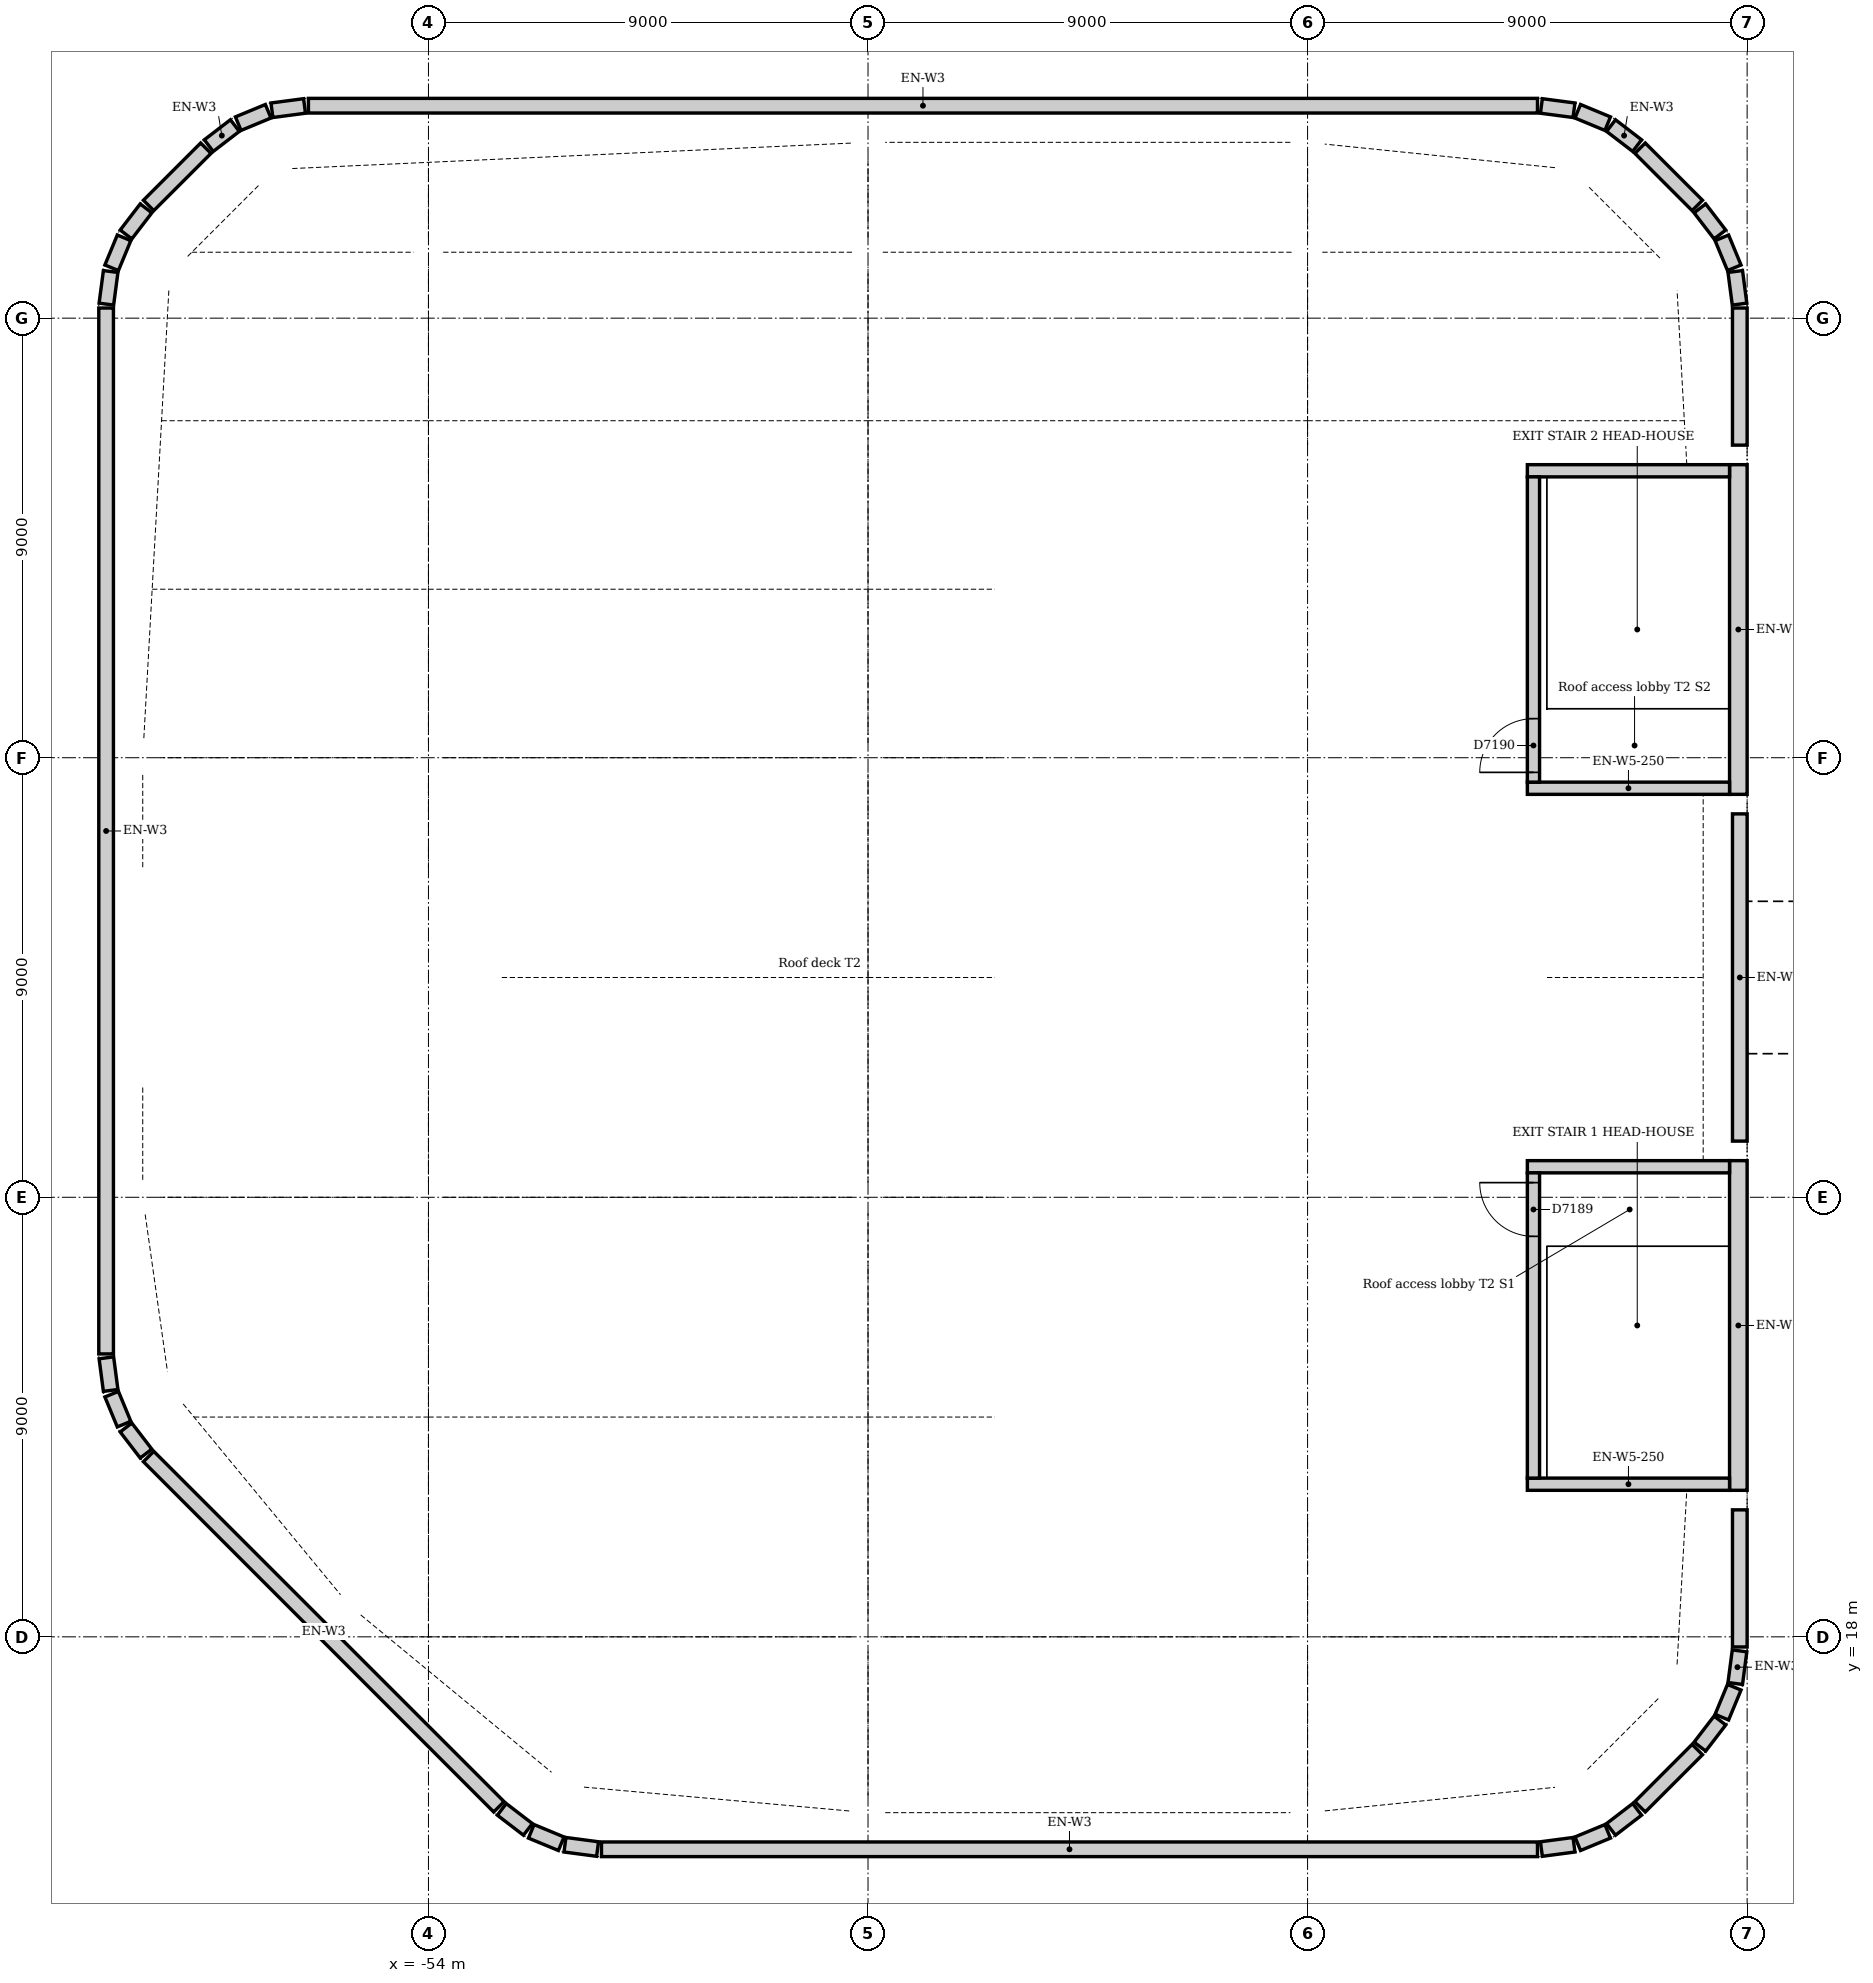
"""IFC4 building model, lengths in metres.
Left out: names, types, materials, properties, quantities, classifications, styles, units other than length and angle.
Written with IfcOpenShell. Run it as: python <this file> out.ifc"""

import sys

from ifc_helpers import new_model, si_unit, direction, frame, frame_2d, origin, place, context, subcontext, project, spatial, rectangle, extrude, element, fill, save


model = new_model("IFC4")
c1 = context("Model", 3, precision=1e-05, world=origin(), true_north=direction((0.0, 1.0)))
c2 = subcontext(c1, "Body", "Model", "MODEL_VIEW")
j1 = project(units=[si_unit("LENGTHUNIT", "METRE"), si_unit("PLANEANGLEUNIT", "RADIAN")], contexts=[c1])
p1 = place(None, origin())
s1 = spatial("IfcSite", under=j1, at=p1, CompositionType="ELEMENT")
p2 = place(p1, origin())
s2 = spatial("IfcBuilding", under=s1, at=p2, CompositionType="ELEMENT")
p3 = place(p2, frame((0.0, 0.0, 144.0)))
s3 = spatial("IfcBuildingStorey", under=s2, at=p3, CompositionType="ELEMENT", Elevation=144.0)
p4 = place(p3, frame((-52.558, 14.52, 0.0), z_axis=(0.0, 0.0, 1.0), x_axis=(-0.707106781187, 0.707106781187, 0.0)))
e1 = element("IfcWall", 1, at=p4, inside=s3, PredefinedType="PARAPET", context=c2, shape_type="SweptSolid", body=[
    extrude(rectangle(XDim=10.143, YDim=0.3, at=frame_2d((5.072, 0.0))), origin(), (0.0, 0.0, 1.0), 1.2),
])
p5 = place(p3, frame((-59.783, 21.752, 0.0), z_axis=(0.0, 0.0, 1.0), x_axis=(-0.608705788034, 0.793396032013, 0.0)))
e2 = element("IfcWall", 2, at=p5, inside=s3, PredefinedType="PARAPET", context=c2, shape_type="SweptSolid", body=[
    extrude(rectangle(XDim=0.674, YDim=0.3, at=frame_2d((0.337, 0.0))), origin(), (0.0, 0.0, 1.0), 1.2),
])
p6 = place(p3, frame((-60.232, 22.355, 0.0), z_axis=(0.0, 0.0, 1.0), x_axis=(-0.382560278547, 0.923930534877, 0.0)))
e3 = element("IfcWall", 3, at=p6, inside=s3, PredefinedType="PARAPET", context=c2, shape_type="SweptSolid", body=[
    extrude(rectangle(XDim=0.664, YDim=0.3, at=frame_2d((0.332, 0.0))), origin(), (0.0, 0.0, 1.0), 1.2),
])
p7 = place(p3, frame((-60.507, 23.045, 0.0), z_axis=(0.0, 0.0, 1.0), x_axis=(-0.130500598182, 0.991448230557, 0.0)))
e4 = element("IfcWall", 4, at=p7, inside=s3, PredefinedType="PARAPET", context=c2, shape_type="SweptSolid", body=[
    extrude(rectangle(XDim=0.674, YDim=0.3, at=frame_2d((0.337, 0.0))), origin(), (0.0, 0.0, 1.0), 1.2),
])
p8 = place(p3, frame((-60.6, 23.793, 0.0), z_axis=(0.0, 0.0, 1.0), x_axis=(0.0, 1.0, 0.0)))
e5 = element("IfcWall", 5, at=p8, inside=s3, PredefinedType="PARAPET", context=c2, shape_type="SweptSolid", body=[
    extrude(rectangle(XDim=21.415, YDim=0.3, at=frame_2d((10.707, 0.0))), origin(), (0.0, 0.0, 1.0), 1.2),
])
p9 = place(p3, frame((-60.595, 45.287, 0.0), z_axis=(0.0, 0.0, 1.0), x_axis=(0.130500598182, 0.991448230557, 0.0)))
e6 = element("IfcWall", 6, at=p9, inside=s3, PredefinedType="PARAPET", context=c2, shape_type="SweptSolid", body=[
    extrude(rectangle(XDim=0.674, YDim=0.3, at=frame_2d((0.337, 0.0))), origin(), (0.0, 0.0, 1.0), 1.2),
])
p10 = place(p3, frame((-60.486, 46.032, 0.0), z_axis=(0.0, 0.0, 1.0), x_axis=(0.382560278547, 0.923930534877, 0.0)))
e7 = element("IfcWall", 7, at=p10, inside=s3, PredefinedType="PARAPET", context=c2, shape_type="SweptSolid", body=[
    extrude(rectangle(XDim=0.664, YDim=0.3, at=frame_2d((0.332, 0.0))), origin(), (0.0, 0.0, 1.0), 1.2),
])
p11 = place(p3, frame((-60.193, 46.713, 0.0), z_axis=(0.0, 0.0, 1.0), x_axis=(0.608705788034, 0.793396032013, 0.0)))
e8 = element("IfcWall", 8, at=p11, inside=s3, PredefinedType="PARAPET", context=c2, shape_type="SweptSolid", body=[
    extrude(rectangle(XDim=0.674, YDim=0.3, at=frame_2d((0.337, 0.0))), origin(), (0.0, 0.0, 1.0), 1.2),
])
p12 = place(p3, frame((-59.73, 47.308, 0.0), z_axis=(0.0, 0.0, 1.0), x_axis=(0.707106781187, 0.707106781187, 0.0)))
e9 = element("IfcWall", 9, at=p12, inside=s3, PredefinedType="PARAPET", context=c2, shape_type="SweptSolid", body=[
    extrude(rectangle(XDim=1.658, YDim=0.3, at=frame_2d((0.829, 0.0))), origin(), (0.0, 0.0, 1.0), 1.2),
])
p13 = place(p3, frame((-58.498, 48.533, 0.0), z_axis=(0.0, 0.0, 1.0), x_axis=(0.793396032013, 0.608705788034, 0.0)))
e10 = element("IfcWall", 10, at=p13, inside=s3, PredefinedType="PARAPET", context=c2, shape_type="SweptSolid", body=[
    extrude(rectangle(XDim=0.674, YDim=0.3, at=frame_2d((0.337, 0.0))), origin(), (0.0, 0.0, 1.0), 1.2),
])
p14 = place(p3, frame((-57.895, 48.982, 0.0), z_axis=(0.0, 0.0, 1.0), x_axis=(0.923930534877, 0.382560278547, 0.0)))
e11 = element("IfcWall", 11, at=p14, inside=s3, PredefinedType="PARAPET", context=c2, shape_type="SweptSolid", body=[
    extrude(rectangle(XDim=0.664, YDim=0.3, at=frame_2d((0.332, 0.0))), origin(), (0.0, 0.0, 1.0), 1.2),
])
p15 = place(p3, frame((-57.205, 49.257, 0.0), z_axis=(0.0, 0.0, 1.0), x_axis=(0.991448230557, 0.130500598182, 0.0)))
e12 = element("IfcWall", 12, at=p15, inside=s3, PredefinedType="PARAPET", context=c2, shape_type="SweptSolid", body=[
    extrude(rectangle(XDim=0.674, YDim=0.3, at=frame_2d((0.337, 0.0))), origin(), (0.0, 0.0, 1.0), 1.2),
])
p16 = place(p3, frame((-56.458, 49.35, 0.0), z_axis=(0.0, 0.0, 1.0), x_axis=(1.0, 0.0, 0.0)))
e13 = element("IfcWall", 13, at=p16, inside=s3, PredefinedType="PARAPET", context=c2, shape_type="SweptSolid", body=[
    extrude(rectangle(XDim=25.165, YDim=0.3, at=frame_2d((12.582, 0.0))), origin(), (0.0, 0.0, 1.0), 1.2),
])
p17 = place(p3, frame((-31.213, 49.345, 0.0), z_axis=(0.0, 0.0, 1.0), x_axis=(0.991448230557, -0.130500598182, 0.0)))
e14 = element("IfcWall", 14, at=p17, inside=s3, PredefinedType="PARAPET", context=c2, shape_type="SweptSolid", body=[
    extrude(rectangle(XDim=0.674, YDim=0.3, at=frame_2d((0.337, 0.0))), origin(), (0.0, 0.0, 1.0), 1.2),
])
p18 = place(p3, frame((-30.468, 49.236, 0.0), z_axis=(0.0, 0.0, 1.0), x_axis=(0.923930534877, -0.382560278547, 0.0)))
e15 = element("IfcWall", 15, at=p18, inside=s3, PredefinedType="PARAPET", context=c2, shape_type="SweptSolid", body=[
    extrude(rectangle(XDim=0.664, YDim=0.3, at=frame_2d((0.332, 0.0))), origin(), (0.0, 0.0, 1.0), 1.2),
])
p19 = place(p3, frame((-29.787, 48.943, 0.0), z_axis=(0.0, 0.0, 1.0), x_axis=(0.793396032013, -0.608705788034, 0.0)))
e16 = element("IfcWall", 16, at=p19, inside=s3, PredefinedType="PARAPET", context=c2, shape_type="SweptSolid", body=[
    extrude(rectangle(XDim=0.674, YDim=0.3, at=frame_2d((0.337, 0.0))), origin(), (0.0, 0.0, 1.0), 1.2),
])
p20 = place(p3, frame((-29.192, 48.48, 0.0), z_axis=(0.0, 0.0, 1.0), x_axis=(0.707106781187, -0.707106781187, 0.0)))
e17 = element("IfcWall", 17, at=p20, inside=s3, PredefinedType="PARAPET", context=c2, shape_type="SweptSolid", body=[
    extrude(rectangle(XDim=1.658, YDim=0.3, at=frame_2d((0.829, 0.0))), origin(), (0.0, 0.0, 1.0), 1.2),
])
p21 = place(p3, frame((-27.967, 47.248, 0.0), z_axis=(0.0, 0.0, 1.0), x_axis=(0.608705788034, -0.793396032013, 0.0)))
e18 = element("IfcWall", 18, at=p21, inside=s3, PredefinedType="PARAPET", context=c2, shape_type="SweptSolid", body=[
    extrude(rectangle(XDim=0.674, YDim=0.3, at=frame_2d((0.337, 0.0))), origin(), (0.0, 0.0, 1.0), 1.2),
])
p22 = place(p3, frame((-27.518, 46.645, 0.0), z_axis=(0.0, 0.0, 1.0), x_axis=(0.382560278547, -0.923930534877, 0.0)))
e19 = element("IfcWall", 19, at=p22, inside=s3, PredefinedType="PARAPET", context=c2, shape_type="SweptSolid", body=[
    extrude(rectangle(XDim=0.664, YDim=0.3, at=frame_2d((0.332, 0.0))), origin(), (0.0, 0.0, 1.0), 1.2),
])
p23 = place(p3, frame((-27.243, 45.955, 0.0), z_axis=(0.0, 0.0, 1.0), x_axis=(0.130500598182, -0.991448230557, 0.0)))
e20 = element("IfcWall", 20, at=p23, inside=s3, PredefinedType="PARAPET", context=c2, shape_type="SweptSolid", body=[
    extrude(rectangle(XDim=0.674, YDim=0.3, at=frame_2d((0.337, 0.0))), origin(), (0.0, 0.0, 1.0), 1.2),
])
p24 = place(p3, frame((-27.15, 45.208, 0.0), z_axis=(0.0, 0.0, 1.0), x_axis=(0.0, -1.0, 0.0)))
e21 = element("IfcWall", 21, at=p24, inside=s3, PredefinedType="PARAPET", context=c2, shape_type="SweptSolid", body=[
    extrude(rectangle(XDim=2.808, YDim=0.3, at=frame_2d((1.404, 0.0))), origin(), (0.0, 0.0, 1.0), 1.2),
])
p25 = place(p3, frame((-27.15, 34.85, 0.0), z_axis=(0.0, 0.0, 1.0), x_axis=(0.0, -1.0, 0.0)))
e22 = element("IfcWall", 22, at=p25, inside=s3, PredefinedType="PARAPET", context=c2, shape_type="SweptSolid", body=[
    extrude(rectangle(XDim=6.7, YDim=0.3, at=frame_2d((3.35, 0.0))), origin(), (0.0, 0.0, 1.0), 1.2),
])
p26 = place(p3, frame((-27.15, 20.6, 0.0), z_axis=(0.0, 0.0, 1.0), x_axis=(0.0, -1.0, 0.0)))
e23 = element("IfcWall", 23, at=p26, inside=s3, PredefinedType="PARAPET", context=c2, shape_type="SweptSolid", body=[
    extrude(rectangle(XDim=2.808, YDim=0.3, at=frame_2d((1.404, 0.0))), origin(), (0.0, 0.0, 1.0), 1.2),
])
p27 = place(p3, frame((-27.155, 17.713, 0.0), z_axis=(0.0, 0.0, 1.0), x_axis=(-0.130500598182, -0.991448230557, 0.0)))
e24 = element("IfcWall", 24, at=p27, inside=s3, PredefinedType="PARAPET", context=c2, shape_type="SweptSolid", body=[
    extrude(rectangle(XDim=0.674, YDim=0.3, at=frame_2d((0.337, 0.0))), origin(), (0.0, 0.0, 1.0), 1.2),
])
p28 = place(p3, frame((-27.264, 16.968, 0.0), z_axis=(0.0, 0.0, 1.0), x_axis=(-0.382560278547, -0.923930534877, 0.0)))
e25 = element("IfcWall", 25, at=p28, inside=s3, PredefinedType="PARAPET", context=c2, shape_type="SweptSolid", body=[
    extrude(rectangle(XDim=0.664, YDim=0.3, at=frame_2d((0.332, 0.0))), origin(), (0.0, 0.0, 1.0), 1.2),
])
p29 = place(p3, frame((-27.557, 16.287, 0.0), z_axis=(0.0, 0.0, 1.0), x_axis=(-0.608705788034, -0.793396032013, 0.0)))
e26 = element("IfcWall", 26, at=p29, inside=s3, PredefinedType="PARAPET", context=c2, shape_type="SweptSolid", body=[
    extrude(rectangle(XDim=0.674, YDim=0.3, at=frame_2d((0.337, 0.0))), origin(), (0.0, 0.0, 1.0), 1.2),
])
p30 = place(p3, frame((-28.02, 15.692, 0.0), z_axis=(0.0, 0.0, 1.0), x_axis=(-0.707106781187, -0.707106781187, 0.0)))
e27 = element("IfcWall", 27, at=p30, inside=s3, PredefinedType="PARAPET", context=c2, shape_type="SweptSolid", body=[
    extrude(rectangle(XDim=1.658, YDim=0.3, at=frame_2d((0.829, 0.0))), origin(), (0.0, 0.0, 1.0), 1.2),
])
p31 = place(p3, frame((-29.252, 14.467, 0.0), z_axis=(0.0, 0.0, 1.0), x_axis=(-0.793396032013, -0.608705788034, 0.0)))
e28 = element("IfcWall", 28, at=p31, inside=s3, PredefinedType="PARAPET", context=c2, shape_type="SweptSolid", body=[
    extrude(rectangle(XDim=0.674, YDim=0.3, at=frame_2d((0.337, 0.0))), origin(), (0.0, 0.0, 1.0), 1.2),
])
p32 = place(p3, frame((-29.855, 14.018, 0.0), z_axis=(0.0, 0.0, 1.0), x_axis=(-0.923930534877, -0.382560278547, 0.0)))
e29 = element("IfcWall", 29, at=p32, inside=s3, PredefinedType="PARAPET", context=c2, shape_type="SweptSolid", body=[
    extrude(rectangle(XDim=0.664, YDim=0.3, at=frame_2d((0.332, 0.0))), origin(), (0.0, 0.0, 1.0), 1.2),
])
p33 = place(p3, frame((-30.545, 13.743, 0.0), z_axis=(0.0, 0.0, 1.0), x_axis=(-0.991448230557, -0.130500598182, 0.0)))
e30 = element("IfcWall", 30, at=p33, inside=s3, PredefinedType="PARAPET", context=c2, shape_type="SweptSolid", body=[
    extrude(rectangle(XDim=0.674, YDim=0.3, at=frame_2d((0.337, 0.0))), origin(), (0.0, 0.0, 1.0), 1.2),
])
p34 = place(p3, frame((-31.293, 13.65, 0.0), z_axis=(0.0, 0.0, 1.0), x_axis=(-1.0, 0.0, 0.0)))
e31 = element("IfcWall", 31, at=p34, inside=s3, PredefinedType="PARAPET", context=c2, shape_type="SweptSolid", body=[
    extrude(rectangle(XDim=19.165, YDim=0.3, at=frame_2d((9.582, 0.0))), origin(), (0.0, 0.0, 1.0), 1.2),
])
p35 = place(p3, frame((-50.537, 13.655, 0.0), z_axis=(0.0, 0.0, 1.0), x_axis=(-0.991448230557, 0.130500598182, 0.0)))
e32 = element("IfcWall", 32, at=p35, inside=s3, PredefinedType="PARAPET", context=c2, shape_type="SweptSolid", body=[
    extrude(rectangle(XDim=0.674, YDim=0.3, at=frame_2d((0.337, 0.0))), origin(), (0.0, 0.0, 1.0), 1.2),
])
p36 = place(p3, frame((-51.282, 13.764, 0.0), z_axis=(0.0, 0.0, 1.0), x_axis=(-0.923930534877, 0.382560278547, 0.0)))
e33 = element("IfcWall", 33, at=p36, inside=s3, PredefinedType="PARAPET", context=c2, shape_type="SweptSolid", body=[
    extrude(rectangle(XDim=0.664, YDim=0.3, at=frame_2d((0.332, 0.0))), origin(), (0.0, 0.0, 1.0), 1.2),
])
p37 = place(p3, frame((-51.963, 14.057, 0.0), z_axis=(0.0, 0.0, 1.0), x_axis=(-0.793396032013, 0.608705788034, 0.0)))
e34 = element("IfcWall", 34, at=p37, inside=s3, PredefinedType="PARAPET", context=c2, shape_type="SweptSolid", body=[
    extrude(rectangle(XDim=0.674, YDim=0.3, at=frame_2d((0.337, 0.0))), origin(), (0.0, 0.0, 1.0), 1.2),
])
p38 = place(p3, frame((-27.18, 21.0, 0.0), z_axis=(0.0, 0.0, 1.0), x_axis=(0.0, 1.0, 0.0)))
e35 = element("IfcWall", 35, at=p38, inside=s3, PredefinedType="STANDARD", context=c2, shape_type="SweptSolid", body=[
    extrude(rectangle(XDim=6.75, YDim=0.36, at=frame_2d((3.375, 0.0))), origin(), (0.0, 0.0, 1.0), 3.0),
])
for number, where, z_axis, x_axis in (
    (36, (-31.5, 21.125, 0.0), (0.0, 0.0, 1.0), (1.0, 0.0, 0.0)),
    (37, (-31.5, 27.625, 0.0), (0.0, 0.0, 1.0), (1.0, 0.0, 0.0)),
):
    element("IfcWall", number, at=place(p3, frame(where, z_axis=z_axis, x_axis=x_axis)), inside=s3, PredefinedType="STANDARD", context=c2, shape_type="SweptSolid", body=[
        extrude(rectangle(XDim=4.14, YDim=0.25, at=frame_2d((2.07, 0.0))), origin(), (0.0, 0.0, 1.0), 3.0),
    ])
p39 = place(p3, frame((-31.375, 21.25, 0.0), z_axis=(0.0, 0.0, 1.0), x_axis=(0.0, 1.0, 0.0)))
e38 = element("IfcWall", 38, at=p39, inside=s3, PredefinedType="STANDARD", context=c2, shape_type="SweptSolid", body=[
    extrude(rectangle(XDim=6.25, YDim=0.25, at=frame_2d((3.125, 0.0))), origin(), (0.0, 0.0, 1.0), 3.0),
])
p40 = place(p39, frame((4.95, 0.0, 0.0)))
e39 = element("IfcOpeningElement", 39, at=p40, cuts=e38, PredefinedType="OPENING", context=c2, shape_type="SweptSolid", body=[
    extrude(rectangle(XDim=1.1, YDim=2.1, at=frame_2d((0.55, 1.05))), frame((0.0, 0.135, 0.0), z_axis=(0.0, -1.0, 0.0), x_axis=(1.0, 0.0, 0.0)), (0.0, 0.0, 1.0), 0.27),
])
p41 = place(p3, frame((-27.18, 35.25, 0.0), z_axis=(0.0, 0.0, 1.0), x_axis=(0.0, 1.0, 0.0)))
e40 = element("IfcWall", 40, at=p41, inside=s3, PredefinedType="STANDARD", context=c2, shape_type="SweptSolid", body=[
    extrude(rectangle(XDim=6.75, YDim=0.36, at=frame_2d((3.375, 0.0))), origin(), (0.0, 0.0, 1.0), 3.0),
])
for number, where, z_axis, x_axis in (
    (41, (-31.5, 35.375, 0.0), (0.0, 0.0, 1.0), (1.0, 0.0, 0.0)),
    (42, (-31.5, 41.875, 0.0), (0.0, 0.0, 1.0), (1.0, 0.0, 0.0)),
):
    element("IfcWall", number, at=place(p3, frame(where, z_axis=z_axis, x_axis=x_axis)), inside=s3, PredefinedType="STANDARD", context=c2, shape_type="SweptSolid", body=[
        extrude(rectangle(XDim=4.14, YDim=0.25, at=frame_2d((2.07, 0.0))), origin(), (0.0, 0.0, 1.0), 3.0),
    ])
p42 = place(p3, frame((-31.375, 35.5, 0.0), z_axis=(0.0, 0.0, 1.0), x_axis=(0.0, 1.0, 0.0)))
e43 = element("IfcWall", 43, at=p42, inside=s3, PredefinedType="STANDARD", context=c2, shape_type="SweptSolid", body=[
    extrude(rectangle(XDim=6.25, YDim=0.25, at=frame_2d((3.125, 0.0))), origin(), (0.0, 0.0, 1.0), 3.0),
])
p43 = place(p42, frame((0.2, 0.0, 0.0)))
e44 = element("IfcOpeningElement", 44, at=p43, cuts=e43, PredefinedType="OPENING", context=c2, shape_type="SweptSolid", body=[
    extrude(rectangle(XDim=1.1, YDim=2.1, at=frame_2d((0.55, 1.05))), frame((0.0, 0.135, 0.0), z_axis=(0.0, -1.0, 0.0), x_axis=(1.0, 0.0, 0.0)), (0.0, 0.0, 1.0), 0.27),
])
p44 = place(p40, origin())
e45 = element("IfcDoor", 45, at=p44, inside=s3, OperationType="SINGLE_SWING_RIGHT", PredefinedType="DOOR", context=c2, shape_type="SweptSolid", body=[
    extrude(rectangle(XDim=1.1, YDim=2.1, at=frame_2d((0.55, 1.05))), frame((0.0, 0.025, 0.0), z_axis=(0.0, -1.0, 0.0), x_axis=(1.0, 0.0, 0.0)), (0.0, 0.0, 1.0), 0.05),
])
fill(e39, e45)
p45 = place(p43, origin())
e46 = element("IfcDoor", 46, at=p45, inside=s3, OperationType="SINGLE_SWING_LEFT", PredefinedType="DOOR", context=c2, shape_type="SweptSolid", body=[
    extrude(rectangle(XDim=1.1, YDim=2.1, at=frame_2d((0.55, 1.05))), frame((0.0, 0.025, 0.0), z_axis=(0.0, -1.0, 0.0), x_axis=(1.0, 0.0, 0.0)), (0.0, 0.0, 1.0), 0.05),
])
fill(e44, e46)
save(model, sys.argv[1])
